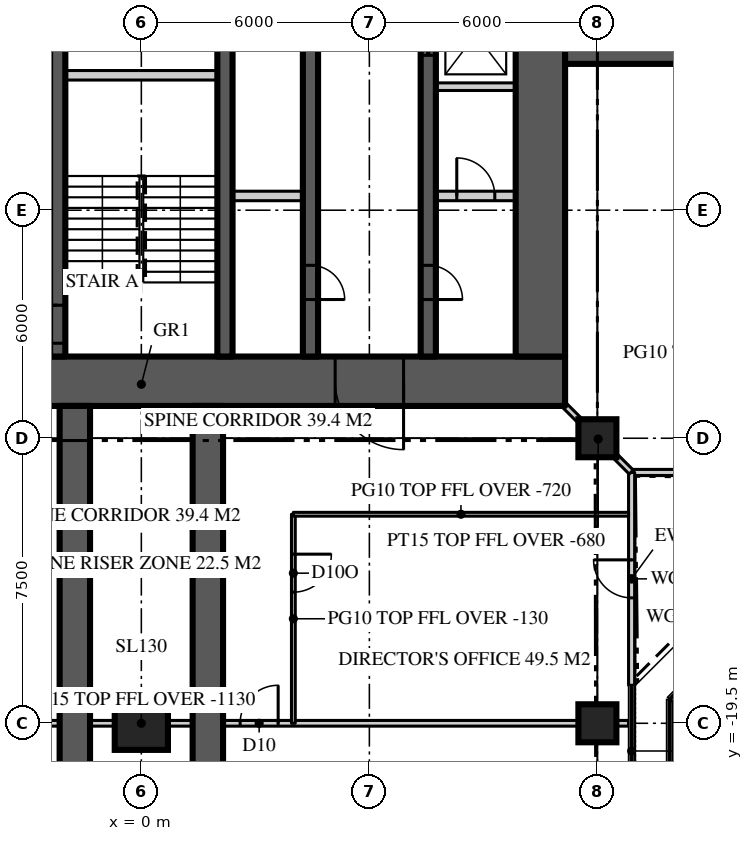
"""IFC4 building model, lengths in metres.
Left out: names, types, materials, properties, quantities, classifications, styles, units other than length and angle.
Written with IfcOpenShell. Run it as: python <this file> out.ifc"""

import sys

from ifc_helpers import new_model, si_unit, direction, frame, frame_2d, origin, origin_2d, place, context, subcontext, project, spatial, rectangle, extrude, element, fill, save


model = new_model("IFC4")
c1 = context("Model", 3, precision=1e-05, world=origin(), true_north=direction((0.0, 1.0)))
c2 = subcontext(c1, "Body", "Model", "MODEL_VIEW")
j1 = project(units=[si_unit("LENGTHUNIT", "METRE"), si_unit("PLANEANGLEUNIT", "RADIAN")], contexts=[c1])
p1 = place(None, origin())
s1 = spatial("IfcSite", under=j1, at=p1, CompositionType="ELEMENT")
p2 = place(p1, origin())
s2 = spatial("IfcBuilding", under=s1, at=p2, CompositionType="ELEMENT")
p3 = place(p2, frame((0.0, 0.0, 286.8)))
s3 = spatial("IfcBuildingStorey", under=s2, at=p3, CompositionType="ELEMENT", Elevation=286.8)
p4 = place(p3, frame((11.15, -10.5, 0.0), z_axis=(0.0, 0.0, 1.0), x_axis=(-1.0, 0.0, 0.0)))
e1 = element("IfcWall", 1, at=p4, inside=s3, PredefinedType="SHEAR", context=c2, shape_type="SweptSolid", body=[
    extrude(rectangle(XDim=22.3, YDim=1.3, at=frame_2d((11.15, 0.0))), origin(), (0.0, 0.0, 1.0), 3.9),
])
p5 = place(p4, frame((16.25, 0.0, 0.0)))
e2 = element("IfcOpeningElement", 2, at=p5, cuts=e1, PredefinedType="OPENING", context=c2, shape_type="SweptSolid", body=[
    extrude(rectangle(XDim=1.8, YDim=2.2, at=frame_2d((0.9, 1.1))), frame((0.0, 0.66, 0.0), z_axis=(0.0, -1.0, 0.0), x_axis=(1.0, 0.0, 0.0)), (0.0, 0.0, 1.0), 1.32),
])
p6 = place(p4, frame((4.25, 0.0, 0.0)))
e3 = element("IfcOpeningElement", 3, at=p6, cuts=e1, PredefinedType="OPENING", context=c2, shape_type="SweptSolid", body=[
    extrude(rectangle(XDim=1.8, YDim=2.2, at=frame_2d((0.9, 1.1))), frame((0.0, 0.66, 0.0), z_axis=(0.0, -1.0, 0.0), x_axis=(1.0, 0.0, 0.0)), (0.0, 0.0, 1.0), 1.32),
])
p7 = place(p3, frame((10.5, -9.85, 0.0), z_axis=(0.0, 0.0, 1.0), x_axis=(0.0, 1.0, 0.0)))
e4 = element("IfcWall", 4, at=p7, inside=s3, PredefinedType="SHEAR", context=c2, shape_type="SweptSolid", body=[
    extrude(rectangle(XDim=19.7, YDim=1.3, at=frame_2d((9.85, 0.0))), origin(), (0.0, 0.0, 1.0), 3.9),
])
p8 = place(p7, frame((17.25, 0.0, 0.0)))
e5 = element("IfcOpeningElement", 5, at=p8, cuts=e4, PredefinedType="OPENING", context=c2, shape_type="SweptSolid", body=[
    extrude(rectangle(XDim=1.0, YDim=2.2, at=frame_2d((0.5, 1.1))), frame((0.0, 0.66, 0.0), z_axis=(0.0, -1.0, 0.0), x_axis=(1.0, 0.0, 0.0)), (0.0, 0.0, 1.0), 1.32),
])
for number, where, z_axis, x_axis in (
    (6, (11.15, -1.75, 0.0), (0.0, 0.0, 1.0), (1.0, 0.0, 0.0)),
    (7, (-1.75, -11.15, 0.0), (0.0, 0.0, 1.0), (0.0, -1.0, 0.0)),
    (8, (1.75, -11.15, 0.0), (0.0, 0.0, 1.0), (0.0, -1.0, 0.0)),
):
    element("IfcWall", number, at=place(p3, frame(where, z_axis=z_axis, x_axis=x_axis)), inside=s3, PredefinedType="SHEAR", context=c2, shape_type="SweptSolid", body=[
        extrude(rectangle(XDim=15.25, YDim=0.8, at=frame_2d((7.625, 0.0))), origin(), (0.0, 0.0, 1.0), 3.9),
    ])
p9 = place(p3, frame((0.0, -19.5, 0.0), z_axis=(0.0, 0.0, 1.0), x_axis=(1.0, 0.0, 0.0)))
e9 = element("IfcColumn", 9, at=p9, inside=s3, PredefinedType="COLUMN", context=c2, shape_type="SweptSolid", body=[
    extrude(rectangle(XDim=1.4, YDim=1.4, at=origin_2d()), origin(), (0.0, 0.0, 1.0), 3.9),
])
for number, where, z_axis, x_axis in (
    (10, (12.0, -19.5, 0.0), (0.0, 0.0, 1.0), (1.0, 0.0, 0.0)),
    (11, (12.0, -12.0, 0.0), (0.0, 0.0, 1.0), (1.0, 0.0, 0.0)),
):
    element("IfcColumn", number, at=place(p3, frame(where, z_axis=z_axis, x_axis=x_axis)), inside=s3, PredefinedType="COLUMN", context=c2, shape_type="SweptSolid", body=[
        extrude(rectangle(XDim=1.0, YDim=1.0, at=origin_2d()), origin(), (0.0, 0.0, 1.0), 3.9),
    ])
p10 = place(p3, frame((12.9, -12.9, 0.0), z_axis=(0.0, 0.0, 1.0), x_axis=(1.0, 0.0, 0.0)))
e12 = element("IfcWall", 12, at=p10, inside=s3, PredefinedType="SOLIDWALL", context=c2, shape_type="SweptSolid", body=[
    extrude(rectangle(XDim=5.6, YDim=0.16, at=frame_2d((2.8, 0.0))), origin(), (0.0, 0.0, 1.0), 3.77),
])
p11 = place(p3, frame((12.9, -18.5, 0.0), z_axis=(0.0, 0.0, 1.0), x_axis=(0.0, 1.0, 0.0)))
e13 = element("IfcWall", 13, at=p11, inside=s3, PredefinedType="SOLIDWALL", context=c2, shape_type="SweptSolid", body=[
    extrude(rectangle(XDim=5.6, YDim=0.16, at=frame_2d((2.8, 0.0))), origin(), (0.0, 0.0, 1.0), 3.77),
])
p12 = place(p11, frame((2.3, 0.0, 0.0)))
e14 = element("IfcOpeningElement", 14, at=p12, cuts=e13, PredefinedType="OPENING", context=c2, shape_type="SweptSolid", body=[
    extrude(rectangle(XDim=1.0, YDim=2.2, at=frame_2d((0.5, 1.1))), frame((0.0, 0.09, 0.0), z_axis=(0.0, -1.0, 0.0), x_axis=(1.0, 0.0, 0.0)), (0.0, 0.0, 1.0), 0.18),
])
p13 = place(p3, frame((7.55, 9.85, 0.0), z_axis=(0.0, 0.0, 1.0), x_axis=(0.0, -1.0, 0.0)))
e15 = element("IfcWall", 15, at=p13, inside=s3, PredefinedType="SHEAR", context=c2, shape_type="SweptSolid", body=[
    extrude(rectangle(XDim=19.7, YDim=0.4, at=frame_2d((9.85, 0.0))), origin(), (0.0, 0.0, 1.0), 3.9),
])
p14 = place(p13, frame((1.45, 0.0, 0.0)))
e16 = element("IfcOpeningElement", 16, at=p14, cuts=e15, PredefinedType="OPENING", context=c2, shape_type="SweptSolid", body=[
    extrude(rectangle(XDim=1.0, YDim=2.2, at=frame_2d((0.5, 1.1))), frame((0.0, 0.21, 0.0), z_axis=(0.0, -1.0, 0.0), x_axis=(1.0, 0.0, 0.0)), (0.0, 0.0, 1.0), 0.42),
])
p15 = place(p13, frame((17.3, 0.0, 0.0)))
e17 = element("IfcOpeningElement", 17, at=p15, cuts=e15, PredefinedType="OPENING", context=c2, shape_type="SweptSolid", body=[
    extrude(rectangle(XDim=0.9, YDim=2.1, at=frame_2d((0.45, 1.05))), frame((0.0, 0.21, 0.0), z_axis=(0.0, -1.0, 0.0), x_axis=(1.0, 0.0, 0.0)), (0.0, 0.0, 1.0), 0.42),
])
p16 = place(p13, frame((7.925, 0.0, 0.0)))
e18 = element("IfcOpeningElement", 18, at=p16, cuts=e15, PredefinedType="OPENING", context=c2, shape_type="SweptSolid", body=[
    extrude(rectangle(XDim=1.1, YDim=2.2, at=frame_2d((0.55, 1.1))), frame((0.0, 0.21, 0.0), z_axis=(0.0, -1.0, 0.0), x_axis=(1.0, 0.0, 0.0)), (0.0, 0.0, 1.0), 0.42),
])
p17 = place(p13, frame((10.675, 0.0, 0.0)))
e19 = element("IfcOpeningElement", 19, at=p17, cuts=e15, PredefinedType="OPENING", context=c2, shape_type="SweptSolid", body=[
    extrude(rectangle(XDim=1.1, YDim=2.2, at=frame_2d((0.55, 1.1))), frame((0.0, 0.21, 0.0), z_axis=(0.0, -1.0, 0.0), x_axis=(1.0, 0.0, 0.0)), (0.0, 0.0, 1.0), 0.42),
])
p18 = place(p3, frame((4.45, 9.85, 0.0), z_axis=(0.0, 0.0, 1.0), x_axis=(0.0, -1.0, 0.0)))
e20 = element("IfcWall", 20, at=p18, inside=s3, PredefinedType="SHEAR", context=c2, shape_type="SweptSolid", body=[
    extrude(rectangle(XDim=19.7, YDim=0.4, at=frame_2d((9.85, 0.0))), origin(), (0.0, 0.0, 1.0), 3.9),
])
p19 = place(p18, frame((1.95, 0.0, 0.0)))
e21 = element("IfcOpeningElement", 21, at=p19, cuts=e20, PredefinedType="OPENING", context=c2, shape_type="SweptSolid", body=[
    extrude(rectangle(XDim=1.0, YDim=2.2, at=frame_2d((0.5, 1.1))), frame((0.0, 0.21, 0.0), z_axis=(0.0, -1.0, 0.0), x_axis=(1.0, 0.0, 0.0)), (0.0, 0.0, 1.0), 0.42),
])
p20 = place(p18, frame((17.3, 0.0, 0.0)))
e22 = element("IfcOpeningElement", 22, at=p20, cuts=e20, PredefinedType="OPENING", context=c2, shape_type="SweptSolid", body=[
    extrude(rectangle(XDim=0.9, YDim=2.1, at=frame_2d((0.45, 1.05))), frame((0.0, 0.21, 0.0), z_axis=(0.0, -1.0, 0.0), x_axis=(1.0, 0.0, 0.0)), (0.0, 0.0, 1.0), 0.42),
])
p21 = place(p18, frame((7.925, 0.0, 0.0)))
e23 = element("IfcOpeningElement", 23, at=p21, cuts=e20, PredefinedType="OPENING", context=c2, shape_type="SweptSolid", body=[
    extrude(rectangle(XDim=1.1, YDim=2.2, at=frame_2d((0.55, 1.1))), frame((0.0, 0.21, 0.0), z_axis=(0.0, -1.0, 0.0), x_axis=(1.0, 0.0, 0.0)), (0.0, 0.0, 1.0), 0.42),
])
p22 = place(p3, frame((-2.2, -9.85, 0.0), z_axis=(0.0, 0.0, 1.0), x_axis=(0.0, 1.0, 0.0)))
e24 = element("IfcWall", 24, at=p22, inside=s3, PredefinedType="SHEAR", context=c2, shape_type="SweptSolid", body=[
    extrude(rectangle(XDim=19.7, YDim=0.4, at=frame_2d((9.85, 0.0))), origin(), (0.0, 0.0, 1.0), 3.9),
])
p23 = place(p22, frame((0.35, 0.0, 0.0)))
e25 = element("IfcOpeningElement", 25, at=p23, cuts=e24, PredefinedType="OPENING", context=c2, shape_type="SweptSolid", body=[
    extrude(rectangle(XDim=1.0, YDim=2.2, at=frame_2d((0.5, 1.1))), frame((0.0, 0.21, 0.0), z_axis=(0.0, -1.0, 0.0), x_axis=(1.0, 0.0, 0.0)), (0.0, 0.0, 1.0), 0.42),
])
p24 = place(p3, frame((2.2, 9.85, 0.0), z_axis=(0.0, 0.0, 1.0), x_axis=(0.0, -1.0, 0.0)))
e26 = element("IfcWall", 26, at=p24, inside=s3, PredefinedType="SHEAR", context=c2, shape_type="SweptSolid", body=[
    extrude(rectangle(XDim=19.7, YDim=0.4, at=frame_2d((9.85, 0.0))), origin(), (0.0, 0.0, 1.0), 3.9),
])
p25 = place(p24, frame((0.35, 0.0, 0.0)))
e27 = element("IfcOpeningElement", 27, at=p25, cuts=e26, PredefinedType="OPENING", context=c2, shape_type="SweptSolid", body=[
    extrude(rectangle(XDim=1.0, YDim=2.2, at=frame_2d((0.5, 1.1))), frame((0.0, 0.21, 0.0), z_axis=(0.0, -1.0, 0.0), x_axis=(1.0, 0.0, 0.0)), (0.0, 0.0, 1.0), 0.42),
])
p26 = place(p3, frame((2.4, -5.625, 0.0), z_axis=(0.0, 0.0, 1.0), x_axis=(1.0, 0.0, 0.0)))
e28 = element("IfcWall", 28, at=p26, inside=s3, PredefinedType="SOLIDWALL", context=c2, shape_type="SweptSolid", body=[
    extrude(rectangle(XDim=1.85, YDim=0.25, at=frame_2d((0.925, 0.0))), origin(), (0.0, 0.0, 1.0), 3.7),
])
p27 = place(p3, frame((7.75, -5.625, 0.0), z_axis=(0.0, 0.0, 1.0), x_axis=(1.0, 0.0, 0.0)))
e29 = element("IfcWall", 29, at=p27, inside=s3, PredefinedType="SOLIDWALL", context=c2, shape_type="SweptSolid", body=[
    extrude(rectangle(XDim=2.1, YDim=0.25, at=frame_2d((1.05, 0.0))), origin(), (0.0, 0.0, 1.0), 3.7),
])
p28 = place(p27, frame((0.55, 0.0, 0.0)))
e30 = element("IfcOpeningElement", 30, at=p28, cuts=e29, PredefinedType="OPENING", context=c2, shape_type="SweptSolid", body=[
    extrude(rectangle(XDim=1.0, YDim=2.2, at=frame_2d((0.5, 1.1))), frame((0.0, 0.135, 0.0), z_axis=(0.0, -1.0, 0.0), x_axis=(1.0, 0.0, 0.0)), (0.0, 0.0, 1.0), 0.27),
])
p29 = place(p3, frame((-2.0, -2.45, 0.0), z_axis=(0.0, 0.0, 1.0), x_axis=(1.0, 0.0, 0.0)))
e31 = element("IfcWall", 31, at=p29, inside=s3, PredefinedType="SOLIDWALL", context=c2, shape_type="SweptSolid", body=[
    extrude(rectangle(XDim=4.0, YDim=0.25, at=frame_2d((2.0, 0.0))), origin(), (0.0, 0.0, 1.0), 3.7),
])
p30 = place(p3, frame((7.75, -2.75, 0.0), z_axis=(0.0, 0.0, 1.0), x_axis=(1.0, 0.0, 0.0)))
e32 = element("IfcWall", 32, at=p30, inside=s3, PredefinedType="SOLIDWALL", context=c2, shape_type="SweptSolid", body=[
    extrude(rectangle(XDim=2.1, YDim=0.2, at=frame_2d((1.05, 0.0))), origin(), (0.0, 0.0, 1.0), 3.7),
])
p31 = place(p3, frame((-12.82, -19.5, 0.0), z_axis=(0.0, 0.0, 1.0), x_axis=(1.0, 0.0, 0.0)))
e33 = element("IfcWall", 33, at=p31, inside=s3, PredefinedType="PARTITIONING", context=c2, shape_type="SweptSolid", body=[
    extrude(rectangle(XDim=25.64, YDim=0.15, at=frame_2d((12.82, 0.0))), origin(), (0.0, 0.0, 1.0), 2.77),
])
p32 = place(p31, frame((15.42, 0.0, 0.0)))
e34 = element("IfcOpeningElement", 34, at=p32, cuts=e33, PredefinedType="OPENING", context=c2, shape_type="SweptSolid", body=[
    extrude(rectangle(XDim=1.0, YDim=2.2, at=frame_2d((0.5, 1.1))), frame((0.0, 0.085, 0.0), z_axis=(0.0, -1.0, 0.0), x_axis=(1.0, 0.0, 0.0)), (0.0, 0.0, 1.0), 0.17),
])
p33 = place(p31, frame((9.22, 0.0, 0.0)))
e35 = element("IfcOpeningElement", 35, at=p33, cuts=e33, PredefinedType="OPENING", context=c2, shape_type="SweptSolid", body=[
    extrude(rectangle(XDim=1.0, YDim=2.2, at=frame_2d((0.5, 1.1))), frame((0.0, 0.085, 0.0), z_axis=(0.0, -1.0, 0.0), x_axis=(1.0, 0.0, 0.0)), (0.0, 0.0, 1.0), 0.17),
])
p34 = place(p3, frame((4.0, -14.0, 0.0), z_axis=(0.0, 0.0, 1.0), x_axis=(0.0, -1.0, 0.0)))
e36 = element("IfcWall", 36, at=p34, inside=s3, PredefinedType="PARTITIONING", context=c2, shape_type="SweptSolid", body=[
    extrude(rectangle(XDim=5.5, YDim=0.1, at=frame_2d((2.75, 0.0))), origin(), (0.0, 0.0, 1.0), 3.77),
])
p35 = place(p34, frame((1.05, 0.0, 0.0)))
e37 = element("IfcOpeningElement", 37, at=p35, cuts=e36, PredefinedType="OPENING", context=c2, shape_type="SweptSolid", body=[
    extrude(rectangle(XDim=1.0, YDim=2.2, at=frame_2d((0.5, 1.1))), frame((0.0, 0.06, 0.0), z_axis=(0.0, -1.0, 0.0), x_axis=(1.0, 0.0, 0.0)), (0.0, 0.0, 1.0), 0.12),
])
p36 = place(p3, frame((4.0, -14.0, 0.0), z_axis=(0.0, 0.0, 1.0), x_axis=(1.0, 0.0, 0.0)))
e38 = element("IfcWall", 38, at=p36, inside=s3, PredefinedType="PARTITIONING", context=c2, shape_type="SweptSolid", body=[
    extrude(rectangle(XDim=8.82, YDim=0.1, at=frame_2d((4.41, 0.0))), origin(), (0.0, 0.0, 1.0), 3.18),
])
p37 = place(p3, frame((11.15, -11.15, 0.0), z_axis=(0.0, 0.0, 1.0), x_axis=(0.707106781187, -0.707106781187, 0.0)))
e39 = element("IfcWall", 39, at=p37, inside=s3, PredefinedType="PARTITIONING", context=c2, shape_type="SweptSolid", body=[
    extrude(rectangle(XDim=2.461, YDim=0.15, at=frame_2d((1.23, 0.0))), origin(), (0.0, 0.0, 1.0), 3.22),
])
p38 = place(p12, origin())
e40 = element("IfcDoor", 40, at=p38, inside=s3, OperationType="SINGLE_SWING_RIGHT", PredefinedType="DOOR", context=c2, shape_type="SweptSolid", body=[
    extrude(rectangle(XDim=1.0, YDim=2.2, at=frame_2d((0.5, 1.1))), frame((0.0, 0.025, 0.0), z_axis=(0.0, -1.0, 0.0), x_axis=(1.0, 0.0, 0.0)), (0.0, 0.0, 1.0), 0.05),
])
fill(e14, e40)
p39 = place(p6, origin())
e41 = element("IfcDoor", 41, at=p39, inside=s3, OperationType="DOUBLE_DOOR_DOUBLE_SWING", PredefinedType="DOOR", context=c2, shape_type="SweptSolid", body=[
    extrude(rectangle(XDim=1.8, YDim=2.2, at=frame_2d((0.9, 1.1))), frame((0.0, 0.025, 0.0), z_axis=(0.0, -1.0, 0.0), x_axis=(1.0, 0.0, 0.0)), (0.0, 0.0, 1.0), 0.05),
])
fill(e3, e41)
p40 = place(p23, origin())
e42 = element("IfcDoor", 42, at=p40, inside=s3, OperationType="SINGLE_SWING_RIGHT", PredefinedType="DOOR", context=c2, shape_type="SweptSolid", body=[
    extrude(rectangle(XDim=1.0, YDim=2.2, at=frame_2d((0.5, 1.1))), frame((0.0, 0.025, 0.0), z_axis=(0.0, -1.0, 0.0), x_axis=(1.0, 0.0, 0.0)), (0.0, 0.0, 1.0), 0.05),
])
fill(e25, e42)
p41 = place(p15, origin())
e43 = element("IfcDoor", 43, at=p41, inside=s3, OperationType="SINGLE_SWING_RIGHT", PredefinedType="DOOR", context=c2, shape_type="SweptSolid", body=[
    extrude(rectangle(XDim=0.9, YDim=2.1, at=frame_2d((0.45, 1.05))), frame((0.0, 0.025, 0.0), z_axis=(0.0, -1.0, 0.0), x_axis=(1.0, 0.0, 0.0)), (0.0, 0.0, 1.0), 0.05),
])
fill(e17, e43)
p42 = place(p20, origin())
e44 = element("IfcDoor", 44, at=p42, inside=s3, OperationType="SINGLE_SWING_RIGHT", PredefinedType="DOOR", context=c2, shape_type="SweptSolid", body=[
    extrude(rectangle(XDim=0.9, YDim=2.1, at=frame_2d((0.45, 1.05))), frame((0.0, 0.025, 0.0), z_axis=(0.0, -1.0, 0.0), x_axis=(1.0, 0.0, 0.0)), (0.0, 0.0, 1.0), 0.05),
])
fill(e22, e44)
p43 = place(p17, origin())
e45 = element("IfcDoor", 45, at=p43, inside=s3, OperationType="SLIDING_TO_LEFT", PredefinedType="DOOR", context=c2, shape_type="SweptSolid", body=[
    extrude(rectangle(XDim=1.1, YDim=2.2, at=frame_2d((0.55, 1.1))), frame((0.0, 0.025, 0.0), z_axis=(0.0, -1.0, 0.0), x_axis=(1.0, 0.0, 0.0)), (0.0, 0.0, 1.0), 0.05),
])
fill(e19, e45)
p44 = place(p32, origin())
e46 = element("IfcDoor", 46, at=p44, inside=s3, OperationType="SINGLE_SWING_RIGHT", PredefinedType="DOOR", context=c2, shape_type="SweptSolid", body=[
    extrude(rectangle(XDim=1.0, YDim=2.2, at=frame_2d((0.5, 1.1))), frame((0.0, 0.025, 0.0), z_axis=(0.0, -1.0, 0.0), x_axis=(1.0, 0.0, 0.0)), (0.0, 0.0, 1.0), 0.05),
])
fill(e34, e46)
p45 = place(p35, origin())
e47 = element("IfcDoor", 47, at=p45, inside=s3, OperationType="SINGLE_SWING_LEFT", PredefinedType="DOOR", context=c2, shape_type="SweptSolid", body=[
    extrude(rectangle(XDim=1.0, YDim=2.2, at=frame_2d((0.5, 1.1))), frame((0.0, 0.025, 0.0), z_axis=(0.0, -1.0, 0.0), x_axis=(1.0, 0.0, 0.0)), (0.0, 0.0, 1.0), 0.05),
])
fill(e37, e47)
p46 = place(p28, origin())
e48 = element("IfcDoor", 48, at=p46, inside=s3, OperationType="SINGLE_SWING_LEFT", PredefinedType="DOOR", context=c2, shape_type="SweptSolid", body=[
    extrude(rectangle(XDim=1.0, YDim=2.2, at=frame_2d((0.5, 1.1))), frame((0.0, 0.025, 0.0), z_axis=(0.0, -1.0, 0.0), x_axis=(1.0, 0.0, 0.0)), (0.0, 0.0, 1.0), 0.05),
])
fill(e30, e48)
save(model, sys.argv[1])
